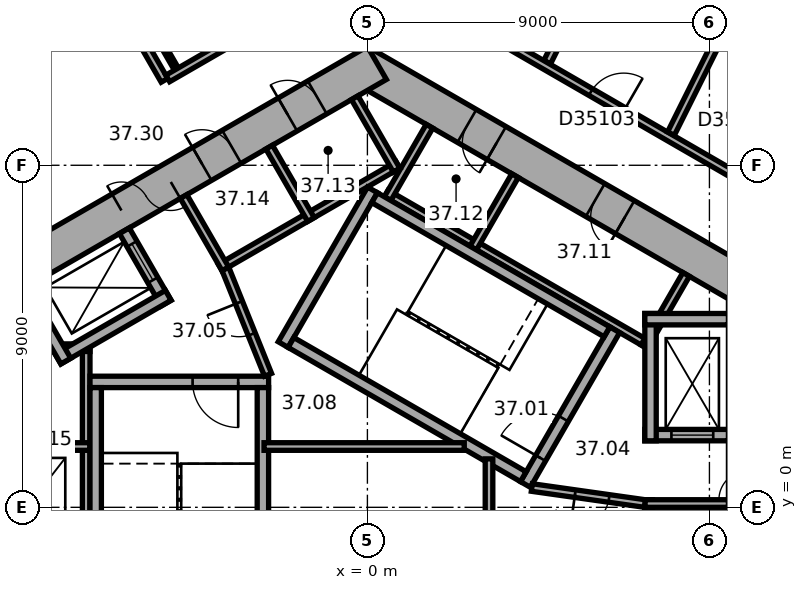
"""IFC4 building model, lengths in metres.
Left out: names, types, materials, properties, quantities, classifications, styles, units other than length and angle.
Written with IfcOpenShell. Run it as: python <this file> out.ifc"""

import sys

from ifc_helpers import new_model, si_unit, direction, frame, frame_2d, origin, place, context, subcontext, project, spatial, rectangle, extrude, element, fill, save


model = new_model("IFC4")
c1 = context("Model", 3, precision=1e-05, world=origin(), true_north=direction((0.0, 1.0)))
c2 = subcontext(c1, "Body", "Model", "MODEL_VIEW")
j1 = project(units=[si_unit("LENGTHUNIT", "METRE"), si_unit("PLANEANGLEUNIT", "RADIAN")], contexts=[c1])
p1 = place(None, origin())
s1 = spatial("IfcSite", under=j1, at=p1, CompositionType="ELEMENT")
p2 = place(p1, origin())
s2 = spatial("IfcBuilding", under=s1, at=p2, CompositionType="ELEMENT")
p3 = place(p2, frame((0.0, 0.0, 154.0)))
s3 = spatial("IfcBuildingStorey", under=s2, at=p3, CompositionType="ELEMENT", Elevation=154.0)
p4 = place(p3, frame((10.25, 5.629, 0.0), z_axis=(0.0, 0.0, 1.0), x_axis=(-0.866022616891, 0.50000482701, 0.0)))
e1 = element("IfcWall", 1, at=p4, inside=s3, PredefinedType="SHEAR", context=c2, shape_type="SweptSolid", body=[
    extrude(rectangle(XDim=12.125, YDim=1.0, at=frame_2d((6.062, 0.0))), origin(), (0.0, 0.0, 1.0), 3.7),
])
p5 = place(p4, frame((4.012, 0.0, 0.0)))
e2 = element("IfcOpeningElement", 2, at=p5, cuts=e1, PredefinedType="OPENING", context=c2, shape_type="SweptSolid", body=[
    extrude(rectangle(XDim=0.9, YDim=2.1, at=frame_2d((0.45, 1.05))), frame((0.0, 0.51, 0.0), z_axis=(0.0, -1.0, 0.0), x_axis=(1.0, 0.0, 0.0)), (0.0, 0.0, 1.0), 1.02),
])
p6 = place(p4, frame((7.912, 0.0, 0.0)))
e3 = element("IfcOpeningElement", 3, at=p6, cuts=e1, PredefinedType="OPENING", context=c2, shape_type="SweptSolid", body=[
    extrude(rectangle(XDim=0.9, YDim=2.1, at=frame_2d((0.45, 1.05))), frame((0.0, 0.51, 0.0), z_axis=(0.0, -1.0, 0.0), x_axis=(1.0, 0.0, 0.0)), (0.0, 0.0, 1.0), 1.02),
])
p7 = place(p3, frame((0.25, 11.691, 0.0), z_axis=(0.0, 0.0, 1.0), x_axis=(-0.866022616891, -0.50000482701, 0.0)))
e4 = element("IfcWall", 4, at=p7, inside=s3, PredefinedType="SHEAR", context=c2, shape_type="SweptSolid", body=[
    extrude(rectangle(XDim=12.125, YDim=1.0, at=frame_2d((6.062, 0.0))), origin(), (0.0, 0.0, 1.0), 3.7),
])
p8 = place(p7, frame((6.262, 0.0, 0.0)))
e5 = element("IfcOpeningElement", 5, at=p8, cuts=e4, PredefinedType="OPENING", context=c2, shape_type="SweptSolid", body=[
    extrude(rectangle(XDim=1.5, YDim=2.1, at=frame_2d((0.75, 1.05))), frame((0.0, 0.51, 0.0), z_axis=(0.0, -1.0, 0.0), x_axis=(1.0, 0.0, 0.0)), (0.0, 0.0, 1.0), 1.02),
])
p9 = place(p7, frame((1.812, 0.0, 0.0)))
e6 = element("IfcOpeningElement", 6, at=p9, cuts=e4, PredefinedType="OPENING", context=c2, shape_type="SweptSolid", body=[
    extrude(rectangle(XDim=0.9, YDim=2.1, at=frame_2d((0.45, 1.05))), frame((0.0, 0.51, 0.0), z_axis=(0.0, -1.0, 0.0), x_axis=(1.0, 0.0, 0.0)), (0.0, 0.0, 1.0), 1.02),
])
p10 = place(p7, frame((4.412, 0.0, 0.0)))
e7 = element("IfcOpeningElement", 7, at=p10, cuts=e4, PredefinedType="OPENING", context=c2, shape_type="SweptSolid", body=[
    extrude(rectangle(XDim=0.9, YDim=2.1, at=frame_2d((0.45, 1.05))), frame((0.0, 0.51, 0.0), z_axis=(0.0, -1.0, 0.0), x_axis=(1.0, 0.0, 0.0)), (0.0, 0.0, 1.0), 1.02),
])
p11 = place(p3, frame((7.4, -5.2, 0.0), z_axis=(0.0, 0.0, 1.0), x_axis=(0.0, 1.0, 0.0)))
e8 = element("IfcWall", 8, at=p11, inside=s3, PredefinedType="PARTITIONING", context=c2, shape_type="SweptSolid", body=[
    extrude(rectangle(XDim=5.4, YDim=0.2, at=frame_2d((2.7, 0.0))), origin(), (0.0, 0.0, 1.0), 3.42),
])
p12 = place(p3, frame((7.3, 0.1, 0.0), z_axis=(0.0, 0.0, 1.0), x_axis=(1.0, 0.0, 0.0)))
e9 = element("IfcWall", 9, at=p12, inside=s3, PredefinedType="PARTITIONING", context=c2, shape_type="SweptSolid", body=[
    extrude(rectangle(XDim=2.2, YDim=0.2, at=frame_2d((1.1, 0.0))), origin(), (0.0, 0.0, 1.0), 3.42),
])
p13 = place(p3, frame((7.424, 4.259, 0.0), z_axis=(0.0, 0.0, 1.0), x_axis=(-0.866026010844, 0.49999894854, 0.0)))
e10 = element("IfcWall", 10, at=p13, inside=s3, PredefinedType="PARTITIONING", context=c2, shape_type="SweptSolid", body=[
    extrude(rectangle(XDim=8.0, YDim=0.2, at=frame_2d((4.0, 0.0))), origin(), (0.0, 0.0, 1.0), 3.42),
])
for number, where, z_axis, x_axis in (
    (11, (7.287, 4.222, 0.0), (0.0, 0.0, 1.0), (0.5, 0.866, 0.0)),
    (12, (2.784, 6.822, 0.0), (0.0, 0.0, 1.0), (0.5, 0.866, 0.0)),
    (13, (0.532, 8.122, 0.0), (0.0, 0.0, 1.0), (0.5, 0.866, 0.0)),
):
    element("IfcWall", number, at=place(p3, frame(where, z_axis=z_axis, x_axis=x_axis)), inside=s3, PredefinedType="PARTITIONING", context=c2, shape_type="SweptSolid", body=[
        extrude(rectangle(XDim=2.2, YDim=0.2, at=frame_2d((1.1, 0.0))), origin(), (0.0, 0.0, 1.0), 3.42),
    ])
p14 = place(p3, frame((0.803, 9.009, 0.0), z_axis=(0.0, 0.0, 1.0), x_axis=(-0.866028230842, -0.499995103361, 0.0)))
e14 = element("IfcWall", 14, at=p14, inside=s3, PredefinedType="PARTITIONING", context=c2, shape_type="SweptSolid", body=[
    extrude(rectangle(XDim=5.4, YDim=0.2, at=frame_2d((2.7, 0.0))), origin(), (0.0, 0.0, 1.0), 3.42),
])
p15 = place(p3, frame((0.767, 8.872, 0.0), z_axis=(0.0, 0.0, 1.0), x_axis=(-0.499994660107, 0.866028486751, 0.0)))
e15 = element("IfcWall", 15, at=p15, inside=s3, PredefinedType="PARTITIONING", context=c2, shape_type="SweptSolid", body=[
    extrude(rectangle(XDim=2.2, YDim=0.2, at=frame_2d((1.1, 0.0))), origin(), (0.0, 0.0, 1.0), 3.42),
])
for number, where, z_axis, x_axis in (
    (16, (-1.485, 7.572, 0.0), (0.0, 0.0, 1.0), (-0.5, 0.866, 0.0)),
    (17, (-3.737, 6.272, 0.0), (0.0, 0.0, 1.0), (-0.5, 0.866, 0.0)),
):
    element("IfcWall", number, at=place(p3, frame(where, z_axis=z_axis, x_axis=x_axis)), inside=s3, PredefinedType="PARTITIONING", context=c2, shape_type="SweptSolid", body=[
        extrude(rectangle(XDim=2.2, YDim=0.2, at=frame_2d((1.1, 0.0))), origin(), (0.0, 0.0, 1.0), 3.42),
    ])
p16 = place(p3, frame((-7.4, 4.3, 0.0), z_axis=(0.0, 0.0, 1.0), x_axis=(0.0, -1.0, 0.0)))
e18 = element("IfcWall", 18, at=p16, inside=s3, PredefinedType="PARTITIONING", context=c2, shape_type="SweptSolid", body=[
    extrude(rectangle(XDim=8.0, YDim=0.2, at=frame_2d((4.0, 0.0))), origin(), (0.0, 0.0, 1.0), 3.42),
])
for number, where, z_axis, x_axis in (
    (19, (-7.3, 4.2, 0.0), (0.0, 0.0, 1.0), (-1.0, 0.0, 0.0)),
    (20, (-7.3, 1.6, 0.0), (0.0, 0.0, 1.0), (-1.0, 0.0, 0.0)),
):
    element("IfcWall", number, at=place(p3, frame(where, z_axis=z_axis, x_axis=x_axis)), inside=s3, PredefinedType="PARTITIONING", context=c2, shape_type="SweptSolid", body=[
        extrude(rectangle(XDim=2.2, YDim=0.2, at=frame_2d((1.1, 0.0))), origin(), (0.0, 0.0, 1.0), 3.42),
    ])
p17 = place(p3, frame((4.158, 0.602, 0.0), z_axis=(0.0, 0.0, 1.0), x_axis=(0.499977259774, 0.866038532462, 0.0)))
e21 = element("IfcWall", 21, at=p17, inside=s3, PredefinedType="SHEAR", context=c2, shape_type="SweptSolid", body=[
    extrude(rectangle(XDim=4.7, YDim=0.3, at=frame_2d((2.35, 0.0))), origin(), (0.0, 0.0, 1.0), 3.42),
])
p18 = place(p17, frame((0.8, 0.0, 0.0)))
e22 = element("IfcOpeningElement", 22, at=p18, cuts=e21, PredefinedType="OPENING", context=c2, shape_type="SweptSolid", body=[
    extrude(rectangle(XDim=1.2, YDim=2.1, at=frame_2d((0.6, 1.05))), frame((0.0, 0.16, 0.0), z_axis=(0.0, -1.0, 0.0), x_axis=(1.0, 0.0, 0.0)), (0.0, 0.0, 1.0), 0.32),
])
p19 = place(p3, frame((-2.216, 4.282, 0.0), z_axis=(0.0, 0.0, 1.0), x_axis=(0.499977259774, 0.866038532462, 0.0)))
e23 = element("IfcWall", 23, at=p19, inside=s3, PredefinedType="SHEAR", context=c2, shape_type="SweptSolid", body=[
    extrude(rectangle(XDim=4.7, YDim=0.3, at=frame_2d((2.35, 0.0))), origin(), (0.0, 0.0, 1.0), 3.42),
])
for number, where, z_axis, x_axis in (
    (24, (4.103, 0.807, 0.0), (0.0, 0.0, 1.0), (-0.866, 0.5, 0.0)),
    (25, (6.303, 4.617, 0.0), (0.0, 0.0, 1.0), (-0.866, 0.5, 0.0)),
):
    element("IfcWall", number, at=place(p3, frame(where, z_axis=z_axis, x_axis=x_axis)), inside=s3, PredefinedType="SHEAR", context=c2, shape_type="SweptSolid", body=[
        extrude(rectangle(XDim=7.06, YDim=0.3, at=frame_2d((3.53, 0.0))), origin(), (0.0, 0.0, 1.0), 3.42),
    ])
p20 = place(p3, frame((-2.6, 3.3, 0.0), z_axis=(0.0, 0.0, 1.0), x_axis=(-1.0, 0.0, 0.0)))
e26 = element("IfcWall", 26, at=p20, inside=s3, PredefinedType="SHEAR", context=c2, shape_type="SweptSolid", body=[
    extrude(rectangle(XDim=4.7, YDim=0.3, at=frame_2d((2.35, 0.0))), origin(), (0.0, 0.0, 1.0), 3.42),
])
p21 = place(p20, frame((0.8, 0.0, 0.0)))
e27 = element("IfcOpeningElement", 27, at=p21, cuts=e26, PredefinedType="OPENING", context=c2, shape_type="SweptSolid", body=[
    extrude(rectangle(XDim=1.2, YDim=2.1, at=frame_2d((0.6, 1.05))), frame((0.0, 0.16, 0.0), z_axis=(0.0, -1.0, 0.0), x_axis=(1.0, 0.0, 0.0)), (0.0, 0.0, 1.0), 0.32),
])
for number, where, z_axis, x_axis in (
    (28, (-2.75, 3.15, 0.0), (0.0, 0.0, 1.0), (0.0, -1.0, 0.0)),
    (29, (-7.15, 3.15, 0.0), (0.0, 0.0, 1.0), (0.0, -1.0, 0.0)),
):
    element("IfcWall", number, at=place(p3, frame(where, z_axis=z_axis, x_axis=x_axis)), inside=s3, PredefinedType="SHEAR", context=c2, shape_type="SweptSolid", body=[
        extrude(rectangle(XDim=7.06, YDim=0.3, at=frame_2d((3.53, 0.0))), origin(), (0.0, 0.0, 1.0), 3.42),
    ])
p22 = place(p3, frame((7.3, 1.9, 0.0), z_axis=(0.0, 0.0, 1.0), x_axis=(1.0, 0.0, 0.0)))
e30 = element("IfcWall", 30, at=p22, inside=s3, PredefinedType="SHEAR", context=c2, shape_type="SweptSolid", body=[
    extrude(rectangle(XDim=2.2, YDim=0.3, at=frame_2d((1.1, 0.0))), origin(), (0.0, 0.0, 1.0), 3.42),
])
p23 = place(p22, frame((0.7, 0.0, 0.0)))
e31 = element("IfcOpeningElement", 31, at=p23, cuts=e30, PredefinedType="OPENING", context=c2, shape_type="SweptSolid", body=[
    extrude(rectangle(XDim=1.1, YDim=2.1, at=frame_2d((0.55, 1.05))), frame((0.0, 0.16, 0.0), z_axis=(0.0, -1.0, 0.0), x_axis=(1.0, 0.0, 0.0)), (0.0, 0.0, 1.0), 0.32),
])
p24 = place(p3, frame((7.45, 1.75, 0.0), z_axis=(0.0, 0.0, 1.0), x_axis=(0.0, 1.0, 0.0)))
e32 = element("IfcWall", 32, at=p24, inside=s3, PredefinedType="SHEAR", context=c2, shape_type="SweptSolid", body=[
    extrude(rectangle(XDim=3.35, YDim=0.3, at=frame_2d((1.675, 0.0))), origin(), (0.0, 0.0, 1.0), 3.42),
])
p25 = place(p3, frame((7.3, 4.95, 0.0), z_axis=(0.0, 0.0, 1.0), x_axis=(1.0, 0.0, 0.0)))
e33 = element("IfcWall", 33, at=p25, inside=s3, PredefinedType="SHEAR", context=c2, shape_type="SweptSolid", body=[
    extrude(rectangle(XDim=2.2, YDim=0.3, at=frame_2d((1.1, 0.0))), origin(), (0.0, 0.0, 1.0), 3.42),
])
p26 = place(p3, frame((4.327, 0.521, 0.0), z_axis=(0.0, 0.0, 1.0), x_axis=(0.990124376366, -0.14019172346, 0.0)))
e34 = element("IfcWall", 34, at=p26, inside=s3, PredefinedType="PARTITIONING", context=c2, shape_type="SweptSolid", body=[
    extrude(rectangle(XDim=3.002, YDim=0.2, at=frame_2d((1.501, 0.0))), origin(), (0.0, 0.0, 1.0), 3.42),
])
p27 = place(p26, frame((1.15, 0.0, 0.0)))
e35 = element("IfcOpeningElement", 35, at=p27, cuts=e34, PredefinedType="OPENING", context=c2, shape_type="SweptSolid", body=[
    extrude(rectangle(XDim=0.9, YDim=2.1, at=frame_2d((0.45, 1.05))), frame((0.0, 0.11, 0.0), z_axis=(0.0, -1.0, 0.0), x_axis=(1.0, 0.0, 0.0)), (0.0, 0.0, 1.0), 0.22),
])
p28 = place(p3, frame((-5.295, 5.372, 0.0), z_axis=(0.0, 0.0, 1.0), x_axis=(-0.500077893725, 0.86598042715, 0.0)))
e36 = element("IfcWall", 36, at=p28, inside=s3, PredefinedType="SHEAR", context=c2, shape_type="SweptSolid", body=[
    extrude(rectangle(XDim=2.2, YDim=0.3, at=frame_2d((1.1, 0.0))), origin(), (0.0, 0.0, 1.0), 3.42),
])
p29 = place(p28, frame((0.7, 0.0, 0.0)))
e37 = element("IfcOpeningElement", 37, at=p29, cuts=e36, PredefinedType="OPENING", context=c2, shape_type="SweptSolid", body=[
    extrude(rectangle(XDim=1.1, YDim=2.1, at=frame_2d((0.55, 1.05))), frame((0.0, 0.16, 0.0), z_axis=(0.0, -1.0, 0.0), x_axis=(1.0, 0.0, 0.0)), (0.0, 0.0, 1.0), 0.32),
])
p30 = place(p3, frame((-5.24, 5.577, 0.0), z_axis=(0.0, 0.0, 1.0), x_axis=(-0.866014461049, -0.500018952895, 0.0)))
e38 = element("IfcWall", 38, at=p30, inside=s3, PredefinedType="SHEAR", context=c2, shape_type="SweptSolid", body=[
    extrude(rectangle(XDim=3.35, YDim=0.3, at=frame_2d((1.675, 0.0))), origin(), (0.0, 0.0, 1.0), 3.42),
])
p31 = place(p3, frame((-7.937, 3.847, 0.0), z_axis=(0.0, 0.0, 1.0), x_axis=(-0.50002983664, 0.866008176907, 0.0)))
e39 = element("IfcWall", 39, at=p31, inside=s3, PredefinedType="SHEAR", context=c2, shape_type="SweptSolid", body=[
    extrude(rectangle(XDim=2.2, YDim=0.3, at=frame_2d((1.1, 0.0))), origin(), (0.0, 0.0, 1.0), 3.42),
])
p32 = place(p3, frame((-2.615, 3.487, 0.0), z_axis=(0.0, 0.0, 1.0), x_axis=(-0.373576831041, 0.92759924068, 0.0)))
e40 = element("IfcWall", 40, at=p32, inside=s3, PredefinedType="PARTITIONING", context=c2, shape_type="SweptSolid", body=[
    extrude(rectangle(XDim=3.002, YDim=0.2, at=frame_2d((1.501, 0.0))), origin(), (0.0, 0.0, 1.0), 3.42),
])
p33 = place(p32, frame((1.15, 0.0, 0.0)))
e41 = element("IfcOpeningElement", 41, at=p33, cuts=e40, PredefinedType="OPENING", context=c2, shape_type="SweptSolid", body=[
    extrude(rectangle(XDim=0.9, YDim=2.1, at=frame_2d((0.45, 1.05))), frame((0.0, 0.11, 0.0), z_axis=(0.0, -1.0, 0.0), x_axis=(1.0, 0.0, 0.0)), (0.0, 0.0, 1.0), 0.22),
])
p34 = place(p3, frame((-2.72, 1.6, 0.0), z_axis=(0.0, 0.0, 1.0), x_axis=(1.0, 0.0, 0.0)))
e42 = element("IfcWall", 42, at=p34, inside=s3, PredefinedType="PARTITIONING", context=c2, shape_type="SweptSolid", body=[
    extrude(rectangle(XDim=5.269, YDim=0.2, at=frame_2d((2.634, 0.0))), origin(), (0.0, 0.0, 1.0), 3.42),
])
p35 = place(p3, frame((3.2, -1.275, 0.0), z_axis=(0.0, 0.0, 1.0), x_axis=(0.0, 1.0, 0.0)))
e43 = element("IfcWall", 43, at=p35, inside=s3, PredefinedType="PARTITIONING", context=c2, shape_type="SweptSolid", body=[
    extrude(rectangle(XDim=2.549, YDim=0.2, at=frame_2d((1.275, 0.0))), origin(), (0.0, 0.0, 1.0), 3.42),
])
p36 = place(p3, frame((-9.515, 18.466, 0.0), z_axis=(0.0, 0.0, 1.0), x_axis=(0.500010139422, -0.866019549707, 0.0)))
e44 = element("IfcWall", 44, at=p36, inside=s3, PredefinedType="PARTITIONING", context=c2, shape_type="SweptSolid", body=[
    extrude(rectangle(XDim=8.35, YDim=0.2, at=frame_2d((4.175, 0.0))), origin(), (0.0, 0.0, 1.0), 2.87),
])
p37 = place(p36, frame((3.275, 0.0, 0.0)))
e45 = element("IfcOpeningElement", 45, at=p37, cuts=e44, PredefinedType="OPENING", context=c2, shape_type="SweptSolid", body=[
    extrude(rectangle(XDim=1.0, YDim=2.1, at=frame_2d((0.5, 1.05))), frame((0.0, 0.11, 0.0), z_axis=(0.0, -1.0, 0.0), x_axis=(1.0, 0.0, 0.0)), (0.0, 0.0, 1.0), 0.22),
])
p38 = place(p3, frame((-5.027, 11.531, 0.0), z_axis=(0.0, 0.0, 1.0), x_axis=(-0.499995802899, 0.866027826969, 0.0)))
e46 = element("IfcWall", 46, at=p38, inside=s3, PredefinedType="PARTITIONING", context=c2, shape_type="SweptSolid", body=[
    extrude(rectangle(XDim=3.84, YDim=0.12, at=frame_2d((1.92, 0.0))), origin(), (0.0, 0.0, 1.0), 3.42),
])
p39 = place(p3, frame((-1.167, 13.645, 0.0), z_axis=(0.0, 0.0, 1.0), x_axis=(-0.866034830959, -0.499983671299, 0.0)))
e47 = element("IfcWall", 47, at=p39, inside=s3, PredefinedType="PARTITIONING", context=c2, shape_type="SweptSolid", body=[
    extrude(rectangle(XDim=4.719, YDim=0.2, at=frame_2d((2.36, 0.0))), origin(), (0.0, 0.0, 1.0), 3.42),
])
p40 = place(p3, frame((8.37, 19.013, 0.0), z_axis=(0.0, 0.0, 1.0), x_axis=(-0.446183598632, -0.894941448538, 0.0)))
e48 = element("IfcWall", 48, at=p40, inside=s3, PredefinedType="PARTITIONING", context=c2, shape_type="SweptSolid", body=[
    extrude(rectangle(XDim=8.156, YDim=0.2, at=frame_2d((4.078, 0.0))), origin(), (0.0, 0.0, 1.0), 3.42),
])
p41 = place(p3, frame((11.233, 7.833, 0.0), z_axis=(0.0, 0.0, 1.0), x_axis=(-0.866021713988, 0.50000639086, 0.0)))
e49 = element("IfcWall", 49, at=p41, inside=s3, PredefinedType="PARTITIONING", context=c2, shape_type="SweptSolid", body=[
    extrude(rectangle(XDim=11.834, YDim=0.2, at=frame_2d((5.917, 0.0))), origin(), (0.0, 0.0, 1.0), 3.42),
])
p42 = place(p41, frame((5.185, 0.0, 0.0)))
e50 = element("IfcOpeningElement", 50, at=p42, cuts=e49, PredefinedType="OPENING", context=c2, shape_type="SweptSolid", body=[
    extrude(rectangle(XDim=1.0, YDim=2.1, at=frame_2d((0.5, 1.05))), frame((0.0, 0.11, 0.0), z_axis=(0.0, -1.0, 0.0), x_axis=(1.0, 0.0, 0.0)), (0.0, 0.0, 1.0), 0.22),
])
p43 = place(p3, frame((11.73, 17.338, 0.0), z_axis=(0.0, 0.0, 1.0), x_axis=(-0.446165200553, -0.894950620881, 0.0)))
e51 = element("IfcWall", 51, at=p43, inside=s3, PredefinedType="PARTITIONING", context=c2, shape_type="SweptSolid", body=[
    extrude(rectangle(XDim=8.386, YDim=0.2, at=frame_2d((4.193, 0.0))), origin(), (0.0, 0.0, 1.0), 2.87),
])
p44 = place(p8, origin())
e52 = element("IfcDoor", 52, at=p44, inside=s3, OperationType="DOUBLE_DOOR_SINGLE_SWING", PredefinedType="DOOR", context=c2, shape_type="SweptSolid", body=[
    extrude(rectangle(XDim=1.5, YDim=2.1, at=frame_2d((0.75, 1.05))), frame((0.0, 0.025, 0.0), z_axis=(0.0, -1.0, 0.0), x_axis=(1.0, 0.0, 0.0)), (0.0, 0.0, 1.0), 0.05),
])
fill(e5, e52)
p45 = place(p18, origin())
e53 = element("IfcDoor", 53, at=p45, inside=s3, OperationType="SINGLE_SWING_RIGHT", PredefinedType="DOOR", context=c2, shape_type="SweptSolid", body=[
    extrude(rectangle(XDim=1.2, YDim=2.1, at=frame_2d((0.6, 1.05))), frame((0.0, 0.025, 0.0), z_axis=(0.0, -1.0, 0.0), x_axis=(1.0, 0.0, 0.0)), (0.0, 0.0, 1.0), 0.05),
])
fill(e22, e53)
p46 = place(p21, origin())
e54 = element("IfcDoor", 54, at=p46, inside=s3, OperationType="SINGLE_SWING_RIGHT", PredefinedType="DOOR", context=c2, shape_type="SweptSolid", body=[
    extrude(rectangle(XDim=1.2, YDim=2.1, at=frame_2d((0.6, 1.05))), frame((0.0, 0.025, 0.0), z_axis=(0.0, -1.0, 0.0), x_axis=(1.0, 0.0, 0.0)), (0.0, 0.0, 1.0), 0.05),
])
fill(e27, e54)
p47 = place(p27, origin())
e55 = element("IfcDoor", 55, at=p47, inside=s3, OperationType="SINGLE_SWING_LEFT", PredefinedType="DOOR", context=c2, shape_type="SweptSolid", body=[
    extrude(rectangle(XDim=0.9, YDim=2.1, at=frame_2d((0.45, 1.05))), frame((0.0, 0.025, 0.0), z_axis=(0.0, -1.0, 0.0), x_axis=(1.0, 0.0, 0.0)), (0.0, 0.0, 1.0), 0.05),
])
fill(e35, e55)
p48 = place(p33, origin())
e56 = element("IfcDoor", 56, at=p48, inside=s3, OperationType="SINGLE_SWING_LEFT", PredefinedType="DOOR", context=c2, shape_type="SweptSolid", body=[
    extrude(rectangle(XDim=0.9, YDim=2.1, at=frame_2d((0.45, 1.05))), frame((0.0, 0.025, 0.0), z_axis=(0.0, -1.0, 0.0), x_axis=(1.0, 0.0, 0.0)), (0.0, 0.0, 1.0), 0.05),
])
fill(e41, e56)
p49 = place(p5, origin())
e57 = element("IfcDoor", 57, at=p49, inside=s3, OperationType="SINGLE_SWING_LEFT", PredefinedType="DOOR", context=c2, shape_type="SweptSolid", body=[
    extrude(rectangle(XDim=0.9, YDim=2.1, at=frame_2d((0.45, 1.05))), frame((0.0, 0.025, 0.0), z_axis=(0.0, -1.0, 0.0), x_axis=(1.0, 0.0, 0.0)), (0.0, 0.0, 1.0), 0.05),
])
fill(e2, e57)
p50 = place(p6, origin())
e58 = element("IfcDoor", 58, at=p50, inside=s3, OperationType="SINGLE_SWING_LEFT", PredefinedType="DOOR", context=c2, shape_type="SweptSolid", body=[
    extrude(rectangle(XDim=0.9, YDim=2.1, at=frame_2d((0.45, 1.05))), frame((0.0, 0.025, 0.0), z_axis=(0.0, -1.0, 0.0), x_axis=(1.0, 0.0, 0.0)), (0.0, 0.0, 1.0), 0.05),
])
fill(e3, e58)
p51 = place(p9, origin())
e59 = element("IfcDoor", 59, at=p51, inside=s3, OperationType="SINGLE_SWING_LEFT", PredefinedType="DOOR", context=c2, shape_type="SweptSolid", body=[
    extrude(rectangle(XDim=0.9, YDim=2.1, at=frame_2d((0.45, 1.05))), frame((0.0, 0.025, 0.0), z_axis=(0.0, -1.0, 0.0), x_axis=(1.0, 0.0, 0.0)), (0.0, 0.0, 1.0), 0.05),
])
fill(e6, e59)
p52 = place(p10, origin())
e60 = element("IfcDoor", 60, at=p52, inside=s3, OperationType="SINGLE_SWING_LEFT", PredefinedType="DOOR", context=c2, shape_type="SweptSolid", body=[
    extrude(rectangle(XDim=0.9, YDim=2.1, at=frame_2d((0.45, 1.05))), frame((0.0, 0.025, 0.0), z_axis=(0.0, -1.0, 0.0), x_axis=(1.0, 0.0, 0.0)), (0.0, 0.0, 1.0), 0.05),
])
fill(e7, e60)
p53 = place(p23, origin())
e61 = element("IfcDoor", 61, at=p53, inside=s3, OperationType="DOUBLE_DOOR_SLIDING", PredefinedType="DOOR", context=c2, shape_type="SweptSolid", body=[
    extrude(rectangle(XDim=1.1, YDim=2.1, at=frame_2d((0.55, 1.05))), frame((0.0, 0.025, 0.0), z_axis=(0.0, -1.0, 0.0), x_axis=(1.0, 0.0, 0.0)), (0.0, 0.0, 1.0), 0.05),
])
fill(e31, e61)
p54 = place(p29, origin())
e62 = element("IfcDoor", 62, at=p54, inside=s3, OperationType="DOUBLE_DOOR_SLIDING", PredefinedType="DOOR", context=c2, shape_type="SweptSolid", body=[
    extrude(rectangle(XDim=1.1, YDim=2.1, at=frame_2d((0.55, 1.05))), frame((0.0, 0.025, 0.0), z_axis=(0.0, -1.0, 0.0), x_axis=(1.0, 0.0, 0.0)), (0.0, 0.0, 1.0), 0.05),
])
fill(e37, e62)
p55 = place(p42, origin())
e63 = element("IfcDoor", 63, at=p55, inside=s3, OperationType="SINGLE_SWING_LEFT", PredefinedType="DOOR", context=c2, shape_type="SweptSolid", body=[
    extrude(rectangle(XDim=1.0, YDim=2.1, at=frame_2d((0.5, 1.05))), frame((0.0, 0.025, 0.0), z_axis=(0.0, -1.0, 0.0), x_axis=(1.0, 0.0, 0.0)), (0.0, 0.0, 1.0), 0.05),
])
fill(e50, e63)
save(model, sys.argv[1])
